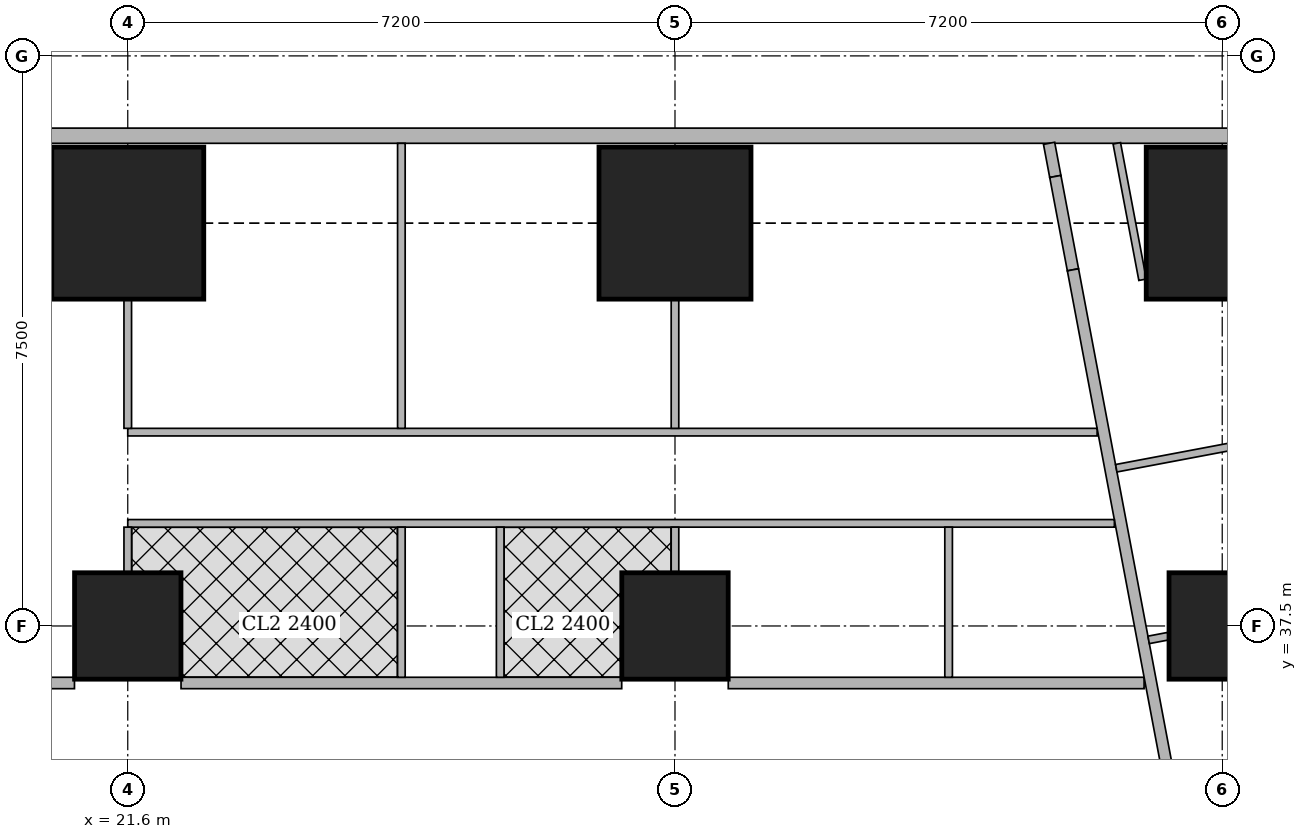
"""IFC4 building model, lengths in metres.
Left out: names, types, materials, properties, quantities, classifications, styles, units other than length and angle.
Written with IfcOpenShell. Run it as: python <this file> out.ifc"""

import sys

from ifc_helpers import new_model, si_unit, direction, frame, frame_2d, origin, origin_2d, place, context, subcontext, project, spatial, rectangle, extrude, element, fill, save


model = new_model("IFC4")
c1 = context("Model", 3, precision=1e-05, world=origin(), true_north=direction((0.0, 1.0)))
c2 = subcontext(c1, "Body", "Model", "MODEL_VIEW")
j1 = project(units=[si_unit("LENGTHUNIT", "METRE"), si_unit("PLANEANGLEUNIT", "RADIAN")], contexts=[c1])
p1 = place(None, origin())
s1 = spatial("IfcSite", under=j1, at=p1, CompositionType="ELEMENT")
p2 = place(p1, origin())
s2 = spatial("IfcBuilding", under=s1, at=p2, CompositionType="ELEMENT")
p3 = place(p2, frame((0.0, 0.0, 262.85)))
s3 = spatial("IfcBuildingStorey", under=s2, at=p3, CompositionType="ELEMENT", Elevation=262.85)
for number, where, z_axis, x_axis in (
    (1, (21.6, 37.5, 0.0), (0.0, 0.0, 1.0), (1.0, 0.0, 0.0)),
    (2, (28.8, 37.5, 0.0), (0.0, 0.0, 1.0), (1.0, 0.0, 0.0)),
    (3, (36.0, 37.5, 0.0), (0.0, 0.0, 1.0), (1.0, 0.0, 0.0)),
):
    element("IfcColumn", number, at=place(p3, frame(where, z_axis=z_axis, x_axis=x_axis)), inside=s3, PredefinedType="COLUMN", context=c2, shape_type="SweptSolid", body=[
        extrude(rectangle(XDim=1.4, YDim=1.4, at=origin_2d()), origin(), (0.0, 0.0, 1.0), 3.75),
    ])
for number, where, z_axis, x_axis in (
    (4, (21.6, 42.8, 0.0), (0.0, 0.0, 1.0), (1.0, 0.0, 0.0)),
    (5, (28.8, 42.8, 0.0), (0.0, 0.0, 1.0), (1.0, 0.0, 0.0)),
    (6, (36.0, 42.8, 0.0), (0.0, 0.0, 1.0), (1.0, 0.0, 0.0)),
):
    element("IfcColumn", number, at=place(p3, frame(where, z_axis=z_axis, x_axis=x_axis)), inside=s3, PredefinedType="COLUMN", context=c2, shape_type="SweptSolid", body=[
        extrude(rectangle(XDim=2.0, YDim=2.0, at=origin_2d()), origin(), (0.0, 0.0, 1.0), 3.75),
    ])
p4 = place(p3, frame((42.103, 43.95, 0.0), z_axis=(0.0, 0.0, 1.0), x_axis=(-1.0, 0.0, 0.0)))
e7 = element("IfcWall", 7, at=p4, inside=s3, PredefinedType="SOLIDWALL", context=c2, shape_type="SweptSolid", body=[
    extrude(rectangle(XDim=27.54, YDim=0.2, at=frame_2d((13.77, 0.0))), origin(), (0.0, 0.0, 1.0), 3.5),
])
p5 = place(p4, frame((10.603, 0.0, 0.9)))
e8 = element("IfcOpeningElement", 8, at=p5, cuts=e7, PredefinedType="OPENING", context=c2, shape_type="SweptSolid", body=[
    extrude(rectangle(XDim=1.8, YDim=1.5, at=frame_2d((0.9, 0.75))), frame((0.0, 0.11, 0.0), z_axis=(0.0, -1.0, 0.0), x_axis=(1.0, 0.0, 0.0)), (0.0, 0.0, 1.0), 0.22),
])
p6 = place(p4, frame((14.203, 0.0, 0.9)))
e9 = element("IfcOpeningElement", 9, at=p6, cuts=e7, PredefinedType="OPENING", context=c2, shape_type="SweptSolid", body=[
    extrude(rectangle(XDim=1.8, YDim=1.5, at=frame_2d((0.9, 0.75))), frame((0.0, 0.11, 0.0), z_axis=(0.0, -1.0, 0.0), x_axis=(1.0, 0.0, 0.0)), (0.0, 0.0, 1.0), 0.22),
])
p7 = place(p4, frame((17.803, 0.0, 0.9)))
e10 = element("IfcOpeningElement", 10, at=p7, cuts=e7, PredefinedType="OPENING", context=c2, shape_type="SweptSolid", body=[
    extrude(rectangle(XDim=1.8, YDim=1.5, at=frame_2d((0.9, 0.75))), frame((0.0, 0.11, 0.0), z_axis=(0.0, -1.0, 0.0), x_axis=(1.0, 0.0, 0.0)), (0.0, 0.0, 1.0), 0.22),
])
p8 = place(p4, frame((22.822, 0.0, 0.9)))
e11 = element("IfcOpeningElement", 11, at=p8, cuts=e7, PredefinedType="OPENING", context=c2, shape_type="SweptSolid", body=[
    extrude(rectangle(XDim=2.4, YDim=1.5, at=frame_2d((1.2, 0.75))), frame((0.0, 0.11, 0.0), z_axis=(0.0, -1.0, 0.0), x_axis=(1.0, 0.0, 0.0)), (0.0, 0.0, 1.0), 0.22),
])
p9 = place(p3, frame((16.001, 36.75, 0.0), z_axis=(0.0, 0.0, 1.0), x_axis=(1.0, 0.0, 0.0)))
e12 = element("IfcWall", 12, at=p9, inside=s3, PredefinedType="SOLIDWALL", context=c2, shape_type="SweptSolid", body=[
    extrude(rectangle(XDim=4.898, YDim=0.15, at=frame_2d((2.449, 0.0))), origin(), (0.0, 0.0, 1.0), 3.5),
])
p10 = place(p9, frame((1.074, 0.0, 0.0)))
e13 = element("IfcOpeningElement", 13, at=p10, cuts=e12, PredefinedType="OPENING", context=c2, shape_type="SweptSolid", body=[
    extrude(rectangle(XDim=1.0, YDim=2.1, at=frame_2d((0.5, 1.05))), frame((0.0, 0.085, 0.0), z_axis=(0.0, -1.0, 0.0), x_axis=(1.0, 0.0, 0.0)), (0.0, 0.0, 1.0), 0.17),
])
p11 = place(p3, frame((22.301, 36.75, 0.0), z_axis=(0.0, 0.0, 1.0), x_axis=(1.0, 0.0, 0.0)))
e14 = element("IfcWall", 14, at=p11, inside=s3, PredefinedType="SOLIDWALL", context=c2, shape_type="SweptSolid", body=[
    extrude(rectangle(XDim=5.798, YDim=0.15, at=frame_2d((2.899, 0.0))), origin(), (0.0, 0.0, 1.0), 3.5),
])
p12 = place(p3, frame((29.501, 36.75, 0.0), z_axis=(0.0, 0.0, 1.0), x_axis=(1.0, 0.0, 0.0)))
e15 = element("IfcWall", 15, at=p12, inside=s3, PredefinedType="SOLIDWALL", context=c2, shape_type="SweptSolid", body=[
    extrude(rectangle(XDim=5.471, YDim=0.15, at=frame_2d((2.735, 0.0))), origin(), (0.0, 0.0, 1.0), 3.5),
])
p13 = place(p3, frame((33.722, 43.85, 0.0), z_axis=(0.0, 0.0, 1.0), x_axis=(0.184886516626, -0.982759877066, 0.0)))
e16 = element("IfcWall", 16, at=p13, inside=s3, PredefinedType="SOLIDWALL", context=c2, shape_type="SweptSolid", body=[
    extrude(rectangle(XDim=0.444, YDim=0.15, at=frame_2d((0.222, 0.0))), origin(), (0.0, 0.0, 1.0), 3.5),
])
p14 = place(p3, frame((33.804, 43.414, 0.0), z_axis=(0.0, 0.0, 1.0), x_axis=(0.185585816539, -0.982628060204, 0.0)))
e17 = element("IfcWall", 17, at=p14, inside=s3, PredefinedType="SOLIDWALL", context=c2, shape_type="SweptSolid", body=[
    extrude(rectangle(XDim=1.25, YDim=0.15, at=frame_2d((0.625, 0.0))), origin(), (0.0, 0.0, 1.0), 2.05),
])
p15 = place(p3, frame((34.036, 42.186, 0.0), z_axis=(0.0, 0.0, 1.0), x_axis=(0.185593518645, -0.9826266055, 0.0)))
e18 = element("IfcWall", 18, at=p15, inside=s3, PredefinedType="SOLIDWALL", context=c2, shape_type="SweptSolid", body=[
    extrude(rectangle(XDim=35.961, YDim=0.15, at=frame_2d((17.98, 0.0))), origin(), (0.0, 0.0, 1.0), 2.5),
])
p16 = place(p15, frame((15.529, 0.0, 0.0)))
e19 = element("IfcOpeningElement", 19, at=p16, cuts=e18, PredefinedType="OPENING", context=c2, shape_type="SweptSolid", body=[
    extrude(rectangle(XDim=1.0, YDim=2.1, at=frame_2d((0.5, 1.05))), frame((0.0, 0.085, 0.0), z_axis=(0.0, -1.0, 0.0), x_axis=(1.0, 0.0, 0.0)), (0.0, 0.0, 1.0), 0.17),
])
p17 = place(p15, frame((19.345, 0.0, 0.0)))
e20 = element("IfcOpeningElement", 20, at=p17, cuts=e18, PredefinedType="OPENING", context=c2, shape_type="SweptSolid", body=[
    extrude(rectangle(XDim=1.0, YDim=2.1, at=frame_2d((0.5, 1.05))), frame((0.0, 0.085, 0.0), z_axis=(0.0, -1.0, 0.0), x_axis=(1.0, 0.0, 0.0)), (0.0, 0.0, 1.0), 0.17),
])
p18 = place(p15, frame((30.594, 0.0, 0.0)))
e21 = element("IfcOpeningElement", 21, at=p18, cuts=e18, PredefinedType="OPENING", context=c2, shape_type="SweptSolid", body=[
    extrude(rectangle(XDim=1.0, YDim=2.1, at=frame_2d((0.5, 1.05))), frame((0.0, 0.085, 0.0), z_axis=(0.0, -1.0, 0.0), x_axis=(1.0, 0.0, 0.0)), (0.0, 0.0, 1.0), 0.17),
])
p19 = place(p3, frame((34.952, 42.055, 0.0), z_axis=(0.0, 0.0, 1.0), x_axis=(-0.185490642006, 0.98264603074, 0.0)))
e22 = element("IfcWall", 22, at=p19, inside=s3, PredefinedType="PARTITIONING", context=c2, shape_type="SweptSolid", body=[
    extrude(rectangle(XDim=1.827, YDim=0.1, at=frame_2d((0.914, 0.0))), origin(), (0.0, 0.0, 1.0), 2.05),
])
p20 = place(p3, frame((37.824, 40.182, 0.0), z_axis=(0.0, 0.0, 1.0), x_axis=(-0.982674977865, -0.185337227447, 0.0)))
e23 = element("IfcWall", 23, at=p20, inside=s3, PredefinedType="PARTITIONING", context=c2, shape_type="SweptSolid", body=[
    extrude(rectangle(XDim=3.275, YDim=0.1, at=frame_2d((1.637, 0.0))), origin(), (0.0, 0.0, 1.0), 3.5),
])
p21 = place(p3, frame((35.29, 37.366, 0.0), z_axis=(0.0, 0.0, 1.0), x_axis=(-0.982395465615, -0.18681313963, 0.0)))
e24 = element("IfcWall", 24, at=p21, inside=s3, PredefinedType="PARTITIONING", context=c2, shape_type="SweptSolid", body=[
    extrude(rectangle(XDim=0.263, YDim=0.1, at=frame_2d((0.131, 0.0))), origin(), (0.0, 0.0, 1.0), 3.5),
])
p22 = place(p3, frame((21.6, 40.05, 0.0), z_axis=(0.0, 0.0, 1.0), x_axis=(1.0, 0.0, 0.0)))
e25 = element("IfcWall", 25, at=p22, inside=s3, PredefinedType="PARTITIONING", context=c2, shape_type="SweptSolid", body=[
    extrude(rectangle(XDim=12.754, YDim=0.1, at=frame_2d((6.377, 0.0))), origin(), (0.0, 0.0, 1.0), 3.5),
])
p23 = place(p22, frame((0.2, 0.0, 0.0)))
e26 = element("IfcOpeningElement", 26, at=p23, cuts=e25, PredefinedType="OPENING", context=c2, shape_type="SweptSolid", body=[
    extrude(rectangle(XDim=0.9, YDim=2.1, at=frame_2d((0.45, 1.05))), frame((0.0, 0.06, 0.0), z_axis=(0.0, -1.0, 0.0), x_axis=(1.0, 0.0, 0.0)), (0.0, 0.0, 1.0), 0.12),
])
p24 = place(p22, frame((3.8, 0.0, 0.0)))
e27 = element("IfcOpeningElement", 27, at=p24, cuts=e25, PredefinedType="OPENING", context=c2, shape_type="SweptSolid", body=[
    extrude(rectangle(XDim=0.9, YDim=2.1, at=frame_2d((0.45, 1.05))), frame((0.0, 0.06, 0.0), z_axis=(0.0, -1.0, 0.0), x_axis=(1.0, 0.0, 0.0)), (0.0, 0.0, 1.0), 0.12),
])
p25 = place(p22, frame((7.4, 0.0, 0.0)))
e28 = element("IfcOpeningElement", 28, at=p25, cuts=e25, PredefinedType="OPENING", context=c2, shape_type="SweptSolid", body=[
    extrude(rectangle(XDim=0.9, YDim=2.1, at=frame_2d((0.45, 1.05))), frame((0.0, 0.06, 0.0), z_axis=(0.0, -1.0, 0.0), x_axis=(1.0, 0.0, 0.0)), (0.0, 0.0, 1.0), 0.12),
])
p26 = place(p3, frame((21.6, 38.85, 0.0), z_axis=(0.0, 0.0, 1.0), x_axis=(1.0, 0.0, 0.0)))
e29 = element("IfcWall", 29, at=p26, inside=s3, PredefinedType="PARTITIONING", context=c2, shape_type="SweptSolid", body=[
    extrude(rectangle(XDim=12.981, YDim=0.1, at=frame_2d((6.49, 0.0))), origin(), (0.0, 0.0, 1.0), 3.5),
])
p27 = place(p26, frame((1.35, 0.0, 0.0)))
e30 = element("IfcOpeningElement", 30, at=p27, cuts=e29, PredefinedType="OPENING", context=c2, shape_type="SweptSolid", body=[
    extrude(rectangle(XDim=0.9, YDim=2.1, at=frame_2d((0.45, 1.05))), frame((0.0, 0.06, 0.0), z_axis=(0.0, -1.0, 0.0), x_axis=(1.0, 0.0, 0.0)), (0.0, 0.0, 1.0), 0.12),
])
p28 = place(p26, frame((5.55, 0.0, 0.0)))
e31 = element("IfcOpeningElement", 31, at=p28, cuts=e29, PredefinedType="OPENING", context=c2, shape_type="SweptSolid", body=[
    extrude(rectangle(XDim=0.9, YDim=2.1, at=frame_2d((0.45, 1.05))), frame((0.0, 0.06, 0.0), z_axis=(0.0, -1.0, 0.0), x_axis=(1.0, 0.0, 0.0)), (0.0, 0.0, 1.0), 0.12),
])
p29 = place(p26, frame((8.55, 0.0, 0.0)))
e32 = element("IfcOpeningElement", 32, at=p29, cuts=e29, PredefinedType="OPENING", context=c2, shape_type="SweptSolid", body=[
    extrude(rectangle(XDim=0.9, YDim=2.1, at=frame_2d((0.45, 1.05))), frame((0.0, 0.06, 0.0), z_axis=(0.0, -1.0, 0.0), x_axis=(1.0, 0.0, 0.0)), (0.0, 0.0, 1.0), 0.12),
])
p30 = place(p26, frame((11.681, 0.0, 0.0)))
e33 = element("IfcOpeningElement", 33, at=p30, cuts=e29, PredefinedType="OPENING", context=c2, shape_type="SweptSolid", body=[
    extrude(rectangle(XDim=0.9, YDim=2.1, at=frame_2d((0.45, 1.05))), frame((0.0, 0.06, 0.0), z_axis=(0.0, -1.0, 0.0), x_axis=(1.0, 0.0, 0.0)), (0.0, 0.0, 1.0), 0.12),
])
p31 = place(p3, frame((21.6, 40.1, 0.0), z_axis=(0.0, 0.0, 1.0), x_axis=(0.0, 1.0, 0.0)))
e34 = element("IfcWall", 34, at=p31, inside=s3, PredefinedType="PARTITIONING", context=c2, shape_type="SweptSolid", body=[
    extrude(rectangle(XDim=1.699, YDim=0.1, at=frame_2d((0.85, 0.0))), origin(), (0.0, 0.0, 1.0), 3.5),
])
p32 = place(p3, frame((25.2, 40.1, 0.0), z_axis=(0.0, 0.0, 1.0), x_axis=(0.0, 1.0, 0.0)))
e35 = element("IfcWall", 35, at=p32, inside=s3, PredefinedType="PARTITIONING", context=c2, shape_type="SweptSolid", body=[
    extrude(rectangle(XDim=3.75, YDim=0.1, at=frame_2d((1.875, 0.0))), origin(), (0.0, 0.0, 1.0), 2.05),
])
p33 = place(p3, frame((28.8, 40.1, 0.0), z_axis=(0.0, 0.0, 1.0), x_axis=(0.0, 1.0, 0.0)))
e36 = element("IfcWall", 36, at=p33, inside=s3, PredefinedType="PARTITIONING", context=c2, shape_type="SweptSolid", body=[
    extrude(rectangle(XDim=1.699, YDim=0.1, at=frame_2d((0.85, 0.0))), origin(), (0.0, 0.0, 1.0), 3.5),
])
p34 = place(p3, frame((21.6, 38.201, 0.0), z_axis=(0.0, 0.0, 1.0), x_axis=(0.0, 1.0, 0.0)))
e37 = element("IfcWall", 37, at=p34, inside=s3, PredefinedType="PARTITIONING", context=c2, shape_type="SweptSolid", body=[
    extrude(rectangle(XDim=0.599, YDim=0.1, at=frame_2d((0.3, 0.0))), origin(), (0.0, 0.0, 1.0), 3.5),
])
p35 = place(p3, frame((25.2, 36.825, 0.0), z_axis=(0.0, 0.0, 1.0), x_axis=(0.0, 1.0, 0.0)))
e38 = element("IfcWall", 38, at=p35, inside=s3, PredefinedType="PARTITIONING", context=c2, shape_type="SweptSolid", body=[
    extrude(rectangle(XDim=1.975, YDim=0.1, at=frame_2d((0.988, 0.0))), origin(), (0.0, 0.0, 1.0), 3.5),
])
p36 = place(p3, frame((28.8, 38.201, 0.0), z_axis=(0.0, 0.0, 1.0), x_axis=(0.0, 1.0, 0.0)))
e39 = element("IfcWall", 39, at=p36, inside=s3, PredefinedType="PARTITIONING", context=c2, shape_type="SweptSolid", body=[
    extrude(rectangle(XDim=0.599, YDim=0.1, at=frame_2d((0.3, 0.0))), origin(), (0.0, 0.0, 1.0), 3.5),
])
p37 = place(p3, frame((32.4, 36.825, 0.0), z_axis=(0.0, 0.0, 1.0), x_axis=(0.0, 1.0, 0.0)))
e40 = element("IfcWall", 40, at=p37, inside=s3, PredefinedType="PARTITIONING", context=c2, shape_type="SweptSolid", body=[
    extrude(rectangle(XDim=1.975, YDim=0.1, at=frame_2d((0.988, 0.0))), origin(), (0.0, 0.0, 1.0), 3.5),
])
p38 = place(p3, frame((26.5, 36.825, 0.0), z_axis=(0.0, 0.0, 1.0), x_axis=(0.0, 1.0, 0.0)))
e41 = element("IfcWall", 41, at=p38, inside=s3, PredefinedType="PARTITIONING", context=c2, shape_type="SweptSolid", body=[
    extrude(rectangle(XDim=1.975, YDim=0.1, at=frame_2d((0.988, 0.0))), origin(), (0.0, 0.0, 1.0), 3.5),
])
p39 = place(p38, frame((0.525, 0.0, 0.0)))
e42 = element("IfcOpeningElement", 42, at=p39, cuts=e41, PredefinedType="OPENING", context=c2, shape_type="SweptSolid", body=[
    extrude(rectangle(XDim=0.9, YDim=2.1, at=frame_2d((0.45, 1.05))), frame((0.0, 0.06, 0.0), z_axis=(0.0, -1.0, 0.0), x_axis=(1.0, 0.0, 0.0)), (0.0, 0.0, 1.0), 0.12),
])
p40 = place(p5, origin())
e43 = element("IfcWindow", 43, at=p40, inside=s3, PartitioningType="SINGLE_PANEL", PredefinedType="WINDOW", context=c2, shape_type="SweptSolid", body=[
    extrude(rectangle(XDim=1.8, YDim=1.5, at=frame_2d((0.9, 0.75))), frame((0.0, 0.03, 0.0), z_axis=(0.0, -1.0, 0.0), x_axis=(1.0, 0.0, 0.0)), (0.0, 0.0, 1.0), 0.06),
])
fill(e8, e43)
p41 = place(p6, origin())
e44 = element("IfcWindow", 44, at=p41, inside=s3, PartitioningType="SINGLE_PANEL", PredefinedType="WINDOW", context=c2, shape_type="SweptSolid", body=[
    extrude(rectangle(XDim=1.8, YDim=1.5, at=frame_2d((0.9, 0.75))), frame((0.0, 0.03, 0.0), z_axis=(0.0, -1.0, 0.0), x_axis=(1.0, 0.0, 0.0)), (0.0, 0.0, 1.0), 0.06),
])
fill(e9, e44)
p42 = place(p7, origin())
e45 = element("IfcWindow", 45, at=p42, inside=s3, PartitioningType="SINGLE_PANEL", PredefinedType="WINDOW", context=c2, shape_type="SweptSolid", body=[
    extrude(rectangle(XDim=1.8, YDim=1.5, at=frame_2d((0.9, 0.75))), frame((0.0, 0.03, 0.0), z_axis=(0.0, -1.0, 0.0), x_axis=(1.0, 0.0, 0.0)), (0.0, 0.0, 1.0), 0.06),
])
fill(e10, e45)
p43 = place(p23, origin())
e46 = element("IfcDoor", 46, at=p43, inside=s3, OperationType="SINGLE_SWING_LEFT", PredefinedType="DOOR", context=c2, shape_type="SweptSolid", body=[
    extrude(rectangle(XDim=0.9, YDim=2.1, at=frame_2d((0.45, 1.05))), frame((0.0, 0.025, 0.0), z_axis=(0.0, -1.0, 0.0), x_axis=(1.0, 0.0, 0.0)), (0.0, 0.0, 1.0), 0.05),
])
fill(e26, e46)
p44 = place(p24, origin())
e47 = element("IfcDoor", 47, at=p44, inside=s3, OperationType="SINGLE_SWING_LEFT", PredefinedType="DOOR", context=c2, shape_type="SweptSolid", body=[
    extrude(rectangle(XDim=0.9, YDim=2.1, at=frame_2d((0.45, 1.05))), frame((0.0, 0.025, 0.0), z_axis=(0.0, -1.0, 0.0), x_axis=(1.0, 0.0, 0.0)), (0.0, 0.0, 1.0), 0.05),
])
fill(e27, e47)
p45 = place(p25, origin())
e48 = element("IfcDoor", 48, at=p45, inside=s3, OperationType="SINGLE_SWING_LEFT", PredefinedType="DOOR", context=c2, shape_type="SweptSolid", body=[
    extrude(rectangle(XDim=0.9, YDim=2.1, at=frame_2d((0.45, 1.05))), frame((0.0, 0.025, 0.0), z_axis=(0.0, -1.0, 0.0), x_axis=(1.0, 0.0, 0.0)), (0.0, 0.0, 1.0), 0.05),
])
fill(e28, e48)
p46 = place(p27, origin())
e49 = element("IfcDoor", 49, at=p46, inside=s3, OperationType="SINGLE_SWING_RIGHT", PredefinedType="DOOR", context=c2, shape_type="SweptSolid", body=[
    extrude(rectangle(XDim=0.9, YDim=2.1, at=frame_2d((0.45, 1.05))), frame((0.0, 0.025, 0.0), z_axis=(0.0, -1.0, 0.0), x_axis=(1.0, 0.0, 0.0)), (0.0, 0.0, 1.0), 0.05),
])
fill(e30, e49)
p47 = place(p28, origin())
e50 = element("IfcDoor", 50, at=p47, inside=s3, OperationType="SINGLE_SWING_RIGHT", PredefinedType="DOOR", context=c2, shape_type="SweptSolid", body=[
    extrude(rectangle(XDim=0.9, YDim=2.1, at=frame_2d((0.45, 1.05))), frame((0.0, 0.025, 0.0), z_axis=(0.0, -1.0, 0.0), x_axis=(1.0, 0.0, 0.0)), (0.0, 0.0, 1.0), 0.05),
])
fill(e31, e50)
p48 = place(p29, origin())
e51 = element("IfcDoor", 51, at=p48, inside=s3, OperationType="SINGLE_SWING_RIGHT", PredefinedType="DOOR", context=c2, shape_type="SweptSolid", body=[
    extrude(rectangle(XDim=0.9, YDim=2.1, at=frame_2d((0.45, 1.05))), frame((0.0, 0.025, 0.0), z_axis=(0.0, -1.0, 0.0), x_axis=(1.0, 0.0, 0.0)), (0.0, 0.0, 1.0), 0.05),
])
fill(e32, e51)
p49 = place(p30, origin())
e52 = element("IfcDoor", 52, at=p49, inside=s3, OperationType="SINGLE_SWING_LEFT", PredefinedType="DOOR", context=c2, shape_type="SweptSolid", body=[
    extrude(rectangle(XDim=0.9, YDim=2.1, at=frame_2d((0.45, 1.05))), frame((0.0, 0.025, 0.0), z_axis=(0.0, -1.0, 0.0), x_axis=(1.0, 0.0, 0.0)), (0.0, 0.0, 1.0), 0.05),
])
fill(e33, e52)
p50 = place(p39, origin())
e53 = element("IfcDoor", 53, at=p50, inside=s3, OperationType="SINGLE_SWING_RIGHT", PredefinedType="DOOR", context=c2, shape_type="SweptSolid", body=[
    extrude(rectangle(XDim=0.9, YDim=2.1, at=frame_2d((0.45, 1.05))), frame((0.0, 0.025, 0.0), z_axis=(0.0, -1.0, 0.0), x_axis=(1.0, 0.0, 0.0)), (0.0, 0.0, 1.0), 0.05),
])
fill(e42, e53)
save(model, sys.argv[1])
